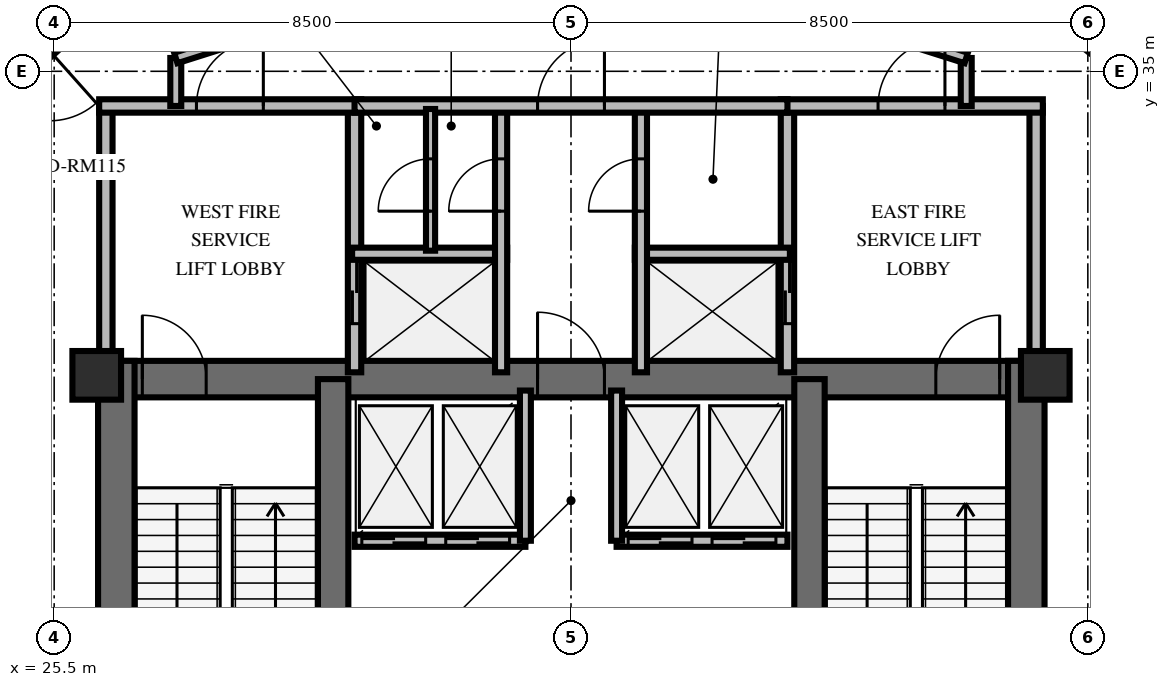
"""IFC4 building model, lengths in metres.
Left out: names, types, materials, properties, quantities, classifications, styles, units other than length and angle.
Written with IfcOpenShell. Run it as: python <this file> out.ifc"""

import sys

from ifc_helpers import new_model, si_unit, direction, frame, frame_2d, origin, origin_2d, place, context, subcontext, project, spatial, rectangle, extrude, element, fill, save


model = new_model("IFC4")
c1 = context("Model", 3, precision=1e-05, world=origin(), true_north=direction((0.0, 1.0)))
c2 = subcontext(c1, "Body", "Model", "MODEL_VIEW")
j1 = project(units=[si_unit("LENGTHUNIT", "METRE"), si_unit("PLANEANGLEUNIT", "RADIAN")], contexts=[c1])
p1 = place(None, origin())
s1 = spatial("IfcSite", under=j1, at=p1, CompositionType="ELEMENT")
p2 = place(p1, origin())
s2 = spatial("IfcBuilding", under=s1, at=p2, CompositionType="ELEMENT")
p3 = place(p2, frame((0.0, 0.0, 284.4)))
s3 = spatial("IfcBuildingStorey", under=s2, at=p3, CompositionType="ELEMENT", Elevation=284.4)
p4 = place(p3, frame((26.222, 29.938, 0.0), z_axis=(0.0, 0.0, 1.0), x_axis=(1.0, 0.0, 0.0)))
e1 = element("IfcWall", 1, at=p4, inside=s3, PredefinedType="SHEAR", context=c2, shape_type="SweptSolid", body=[
    extrude(rectangle(XDim=15.566, YDim=0.6, at=frame_2d((7.783, 0.0))), origin(), (0.0, 0.0, 1.0), 3.6),
])
p5 = place(p4, frame((0.728, 0.0, 0.0)))
e2 = element("IfcOpeningElement", 2, at=p5, cuts=e1, PredefinedType="OPENING", context=c2, shape_type="SweptSolid", body=[
    extrude(rectangle(XDim=1.05, YDim=2.15, at=frame_2d((0.525, 1.075))), frame((0.0, 0.31, 0.0), z_axis=(0.0, -1.0, 0.0), x_axis=(1.0, 0.0, 0.0)), (0.0, 0.0, 1.0), 0.62),
])
p6 = place(p4, frame((13.778, 0.0, 0.0)))
e3 = element("IfcOpeningElement", 3, at=p6, cuts=e1, PredefinedType="OPENING", context=c2, shape_type="SweptSolid", body=[
    extrude(rectangle(XDim=1.05, YDim=2.15, at=frame_2d((0.525, 1.075))), frame((0.0, 0.31, 0.0), z_axis=(0.0, -1.0, 0.0), x_axis=(1.0, 0.0, 0.0)), (0.0, 0.0, 1.0), 0.62),
])
p7 = place(p4, frame((7.228, 0.0, 0.0)))
e4 = element("IfcOpeningElement", 4, at=p7, cuts=e1, PredefinedType="OPENING", context=c2, shape_type="SweptSolid", body=[
    extrude(rectangle(XDim=1.1, YDim=2.15, at=frame_2d((0.55, 1.075))), frame((0.0, 0.31, 0.0), z_axis=(0.0, -1.0, 0.0), x_axis=(1.0, 0.0, 0.0)), (0.0, 0.0, 1.0), 0.62),
])
for number, where, z_axis, x_axis in (
    (5, (26.522, 19.962, 0.0), (0.0, 0.0, 1.0), (0.0, 1.0, 0.0)),
    (6, (41.488, 19.962, 0.0), (0.0, 0.0, 1.0), (0.0, 1.0, 0.0)),
):
    element("IfcWall", number, at=place(p3, frame(where, z_axis=z_axis, x_axis=x_axis)), inside=s3, PredefinedType="SHEAR", context=c2, shape_type="SweptSolid", body=[
        extrude(rectangle(XDim=10.276, YDim=0.6, at=frame_2d((5.138, 0.0))), origin(), (0.0, 0.0, 1.0), 3.6),
    ])
for number, where, z_axis, x_axis in (
    (7, (30.088, 20.262, 0.0), (0.0, 0.0, 1.0), (0.0, 1.0, 0.0)),
    (8, (37.922, 20.262, 0.0), (0.0, 0.0, 1.0), (0.0, 1.0, 0.0)),
):
    element("IfcWall", number, at=place(p3, frame(where, z_axis=z_axis, x_axis=x_axis)), inside=s3, PredefinedType="SHEAR", context=c2, shape_type="SweptSolid", body=[
        extrude(rectangle(XDim=9.676, YDim=0.5, at=frame_2d((4.838, 0.0))), origin(), (0.0, 0.0, 1.0), 3.6),
    ])
for number, where, z_axis, x_axis in (
    (9, (26.2, 30.0, 0.0), (0.0, 0.0, 1.0), (1.0, 0.0, 0.0)),
    (10, (41.8, 30.0, 0.0), (0.0, 0.0, 1.0), (1.0, 0.0, 0.0)),
):
    element("IfcColumn", number, at=place(p3, frame(where, z_axis=z_axis, x_axis=x_axis)), inside=s3, PredefinedType="PILASTER", context=c2, shape_type="SweptSolid", body=[
        extrude(rectangle(XDim=0.8, YDim=0.8, at=origin_2d()), origin(), (0.0, 0.0, 1.0), 3.6),
    ])
p8 = place(p3, frame((26.35, 30.05, 0.0), z_axis=(0.0, 0.0, 1.0), x_axis=(0.0, 1.0, 0.0)))
e11 = element("IfcWall", 11, at=p8, inside=s3, PredefinedType="SOLIDWALL", context=c2, shape_type="SweptSolid", body=[
    extrude(rectangle(XDim=4.38, YDim=0.22, at=frame_2d((2.19, 0.0))), origin(), (0.0, 0.0, 1.0), 2.12),
])
p9 = place(p3, frame((30.44, 30.05, 0.0), z_axis=(0.0, 0.0, 1.0), x_axis=(0.0, 1.0, 0.0)))
e12 = element("IfcWall", 12, at=p9, inside=s3, PredefinedType="SOLIDWALL", context=c2, shape_type="SweptSolid", body=[
    extrude(rectangle(XDim=4.38, YDim=0.22, at=frame_2d((2.19, 0.0))), origin(), (0.0, 0.0, 1.0), 2.12),
])
p10 = place(p9, frame((0.8, 0.0, 0.0)))
e13 = element("IfcOpeningElement", 13, at=p10, cuts=e12, PredefinedType="OPENING", context=c2, shape_type="SweptSolid", body=[
    extrude(rectangle(XDim=1.05, YDim=2.1, at=frame_2d((0.525, 1.05))), frame((0.0, 0.12, 0.0), z_axis=(0.0, -1.0, 0.0), x_axis=(1.0, 0.0, 0.0)), (0.0, 0.0, 1.0), 0.24),
])
p11 = place(p3, frame((26.24, 34.43, 0.0), z_axis=(0.0, 0.0, 1.0), x_axis=(1.0, 0.0, 0.0)))
e14 = element("IfcWall", 14, at=p11, inside=s3, PredefinedType="SOLIDWALL", context=c2, shape_type="SweptSolid", body=[
    extrude(rectangle(XDim=4.31, YDim=0.22, at=frame_2d((2.155, 0.0))), origin(), (0.0, 0.0, 1.0), 2.12),
])
p12 = place(p11, frame((1.6, 0.0, 0.0)))
e15 = element("IfcOpeningElement", 15, at=p12, cuts=e14, PredefinedType="OPENING", context=c2, shape_type="SweptSolid", body=[
    extrude(rectangle(XDim=1.1, YDim=2.15, at=frame_2d((0.55, 1.075))), frame((0.0, 0.12, 0.0), z_axis=(0.0, -1.0, 0.0), x_axis=(1.0, 0.0, 0.0)), (0.0, 0.0, 1.0), 0.24),
])
p13 = place(p3, frame((30.4, 32.0, 0.0), z_axis=(0.0, 0.0, 1.0), x_axis=(1.0, 0.0, 0.0)))
e16 = element("IfcWall", 16, at=p13, inside=s3, PredefinedType="SOLIDWALL", context=c2, shape_type="SweptSolid", body=[
    extrude(rectangle(XDim=2.55, YDim=0.2, at=frame_2d((1.275, 0.0))), origin(), (0.0, 0.0, 1.0), 2.12),
])
p14 = place(p3, frame((32.85, 30.05, 0.0), z_axis=(0.0, 0.0, 1.0), x_axis=(0.0, 1.0, 0.0)))
e17 = element("IfcWall", 17, at=p14, inside=s3, PredefinedType="SOLIDWALL", context=c2, shape_type="SweptSolid", body=[
    extrude(rectangle(XDim=4.38, YDim=0.2, at=frame_2d((2.19, 0.0))), origin(), (0.0, 0.0, 1.0), 2.12),
])
p15 = place(p14, frame((2.65, 0.0, 0.0)))
e18 = element("IfcOpeningElement", 18, at=p15, cuts=e17, PredefinedType="OPENING", context=c2, shape_type="SweptSolid", body=[
    extrude(rectangle(XDim=0.86, YDim=2.05, at=frame_2d((0.43, 1.025))), frame((0.0, 0.11, 0.0), z_axis=(0.0, -1.0, 0.0), x_axis=(1.0, 0.0, 0.0)), (0.0, 0.0, 1.0), 0.22),
])
p16 = place(p3, frame((37.56, 30.05, 0.0), z_axis=(0.0, 0.0, 1.0), x_axis=(0.0, 1.0, 0.0)))
e19 = element("IfcWall", 19, at=p16, inside=s3, PredefinedType="SOLIDWALL", context=c2, shape_type="SweptSolid", body=[
    extrude(rectangle(XDim=4.38, YDim=0.22, at=frame_2d((2.19, 0.0))), origin(), (0.0, 0.0, 1.0), 2.12),
])
p17 = place(p16, frame((0.8, 0.0, 0.0)))
e20 = element("IfcOpeningElement", 20, at=p17, cuts=e19, PredefinedType="OPENING", context=c2, shape_type="SweptSolid", body=[
    extrude(rectangle(XDim=1.05, YDim=2.1, at=frame_2d((0.525, 1.05))), frame((0.0, 0.12, 0.0), z_axis=(0.0, -1.0, 0.0), x_axis=(1.0, 0.0, 0.0)), (0.0, 0.0, 1.0), 0.24),
])
p18 = place(p3, frame((41.65, 30.05, 0.0), z_axis=(0.0, 0.0, 1.0), x_axis=(0.0, 1.0, 0.0)))
e21 = element("IfcWall", 21, at=p18, inside=s3, PredefinedType="SOLIDWALL", context=c2, shape_type="SweptSolid", body=[
    extrude(rectangle(XDim=4.38, YDim=0.22, at=frame_2d((2.19, 0.0))), origin(), (0.0, 0.0, 1.0), 2.12),
])
p19 = place(p3, frame((37.45, 34.43, 0.0), z_axis=(0.0, 0.0, 1.0), x_axis=(1.0, 0.0, 0.0)))
e22 = element("IfcWall", 22, at=p19, inside=s3, PredefinedType="SOLIDWALL", context=c2, shape_type="SweptSolid", body=[
    extrude(rectangle(XDim=4.31, YDim=0.22, at=frame_2d((2.155, 0.0))), origin(), (0.0, 0.0, 1.0), 2.12),
])
p20 = place(p19, frame((1.6, 0.0, 0.0)))
e23 = element("IfcOpeningElement", 23, at=p20, cuts=e22, PredefinedType="OPENING", context=c2, shape_type="SweptSolid", body=[
    extrude(rectangle(XDim=1.1, YDim=2.15, at=frame_2d((0.55, 1.075))), frame((0.0, 0.12, 0.0), z_axis=(0.0, -1.0, 0.0), x_axis=(1.0, 0.0, 0.0)), (0.0, 0.0, 1.0), 0.24),
])
p21 = place(p3, frame((35.05, 32.0, 0.0), z_axis=(0.0, 0.0, 1.0), x_axis=(1.0, 0.0, 0.0)))
e24 = element("IfcWall", 24, at=p21, inside=s3, PredefinedType="SOLIDWALL", context=c2, shape_type="SweptSolid", body=[
    extrude(rectangle(XDim=2.55, YDim=0.2, at=frame_2d((1.275, 0.0))), origin(), (0.0, 0.0, 1.0), 2.12),
])
p22 = place(p3, frame((35.15, 30.05, 0.0), z_axis=(0.0, 0.0, 1.0), x_axis=(0.0, 1.0, 0.0)))
e25 = element("IfcWall", 25, at=p22, inside=s3, PredefinedType="SOLIDWALL", context=c2, shape_type="SweptSolid", body=[
    extrude(rectangle(XDim=4.38, YDim=0.2, at=frame_2d((2.19, 0.0))), origin(), (0.0, 0.0, 1.0), 2.12),
])
p23 = place(p22, frame((2.65, 0.0, 0.0)))
e26 = element("IfcOpeningElement", 26, at=p23, cuts=e25, PredefinedType="OPENING", context=c2, shape_type="SweptSolid", body=[
    extrude(rectangle(XDim=0.86, YDim=2.05, at=frame_2d((0.43, 1.025))), frame((0.0, 0.11, 0.0), z_axis=(0.0, -1.0, 0.0), x_axis=(1.0, 0.0, 0.0)), (0.0, 0.0, 1.0), 0.22),
])
p24 = place(p3, frame((30.44, 34.43, 0.0), z_axis=(0.0, 0.0, 1.0), x_axis=(1.0, 0.0, 0.0)))
e27 = element("IfcWall", 27, at=p24, inside=s3, PredefinedType="SOLIDWALL", context=c2, shape_type="SweptSolid", body=[
    extrude(rectangle(XDim=7.12, YDim=0.22, at=frame_2d((3.56, 0.0))), origin(), (0.0, 0.0, 1.0), 2.12),
])
p25 = place(p24, frame((3.01, 0.0, 0.0)))
e28 = element("IfcOpeningElement", 28, at=p25, cuts=e27, PredefinedType="OPENING", context=c2, shape_type="SweptSolid", body=[
    extrude(rectangle(XDim=1.1, YDim=2.15, at=frame_2d((0.55, 1.075))), frame((0.0, 0.12, 0.0), z_axis=(0.0, -1.0, 0.0), x_axis=(1.0, 0.0, 0.0)), (0.0, 0.0, 1.0), 0.24),
])
p26 = place(p3, frame((31.69, 32.05, 0.0), z_axis=(0.0, 0.0, 1.0), x_axis=(0.0, 1.0, 0.0)))
e29 = element("IfcWall", 29, at=p26, inside=s3, PredefinedType="PARTITIONING", context=c2, shape_type="SweptSolid", body=[
    extrude(rectangle(XDim=2.33, YDim=0.15, at=frame_2d((1.165, 0.0))), origin(), (0.0, 0.0, 1.0), 2.12),
])
p27 = place(p26, frame((0.65, 0.0, 0.0)))
e30 = element("IfcOpeningElement", 30, at=p27, cuts=e29, PredefinedType="OPENING", context=c2, shape_type="SweptSolid", body=[
    extrude(rectangle(XDim=0.86, YDim=2.05, at=frame_2d((0.43, 1.025))), frame((0.0, 0.085, 0.0), z_axis=(0.0, -1.0, 0.0), x_axis=(1.0, 0.0, 0.0)), (0.0, 0.0, 1.0), 0.17),
])
p28 = place(p3, frame((30.44, 27.28, 0.0), z_axis=(0.0, 0.0, 1.0), x_axis=(1.0, 0.0, 0.0)))
e31 = element("IfcWall", 31, at=p28, inside=s3, PredefinedType="SOLIDWALL", context=c2, shape_type="SweptSolid", body=[
    extrude(rectangle(XDim=2.81, YDim=0.2, at=frame_2d((1.405, 0.0))), origin(), (0.0, 0.0, 1.0), 2.1),
])
p29 = place(p28, frame((0.12, 0.0, 0.0)))
e32 = element("IfcOpeningElement", 32, at=p29, cuts=e31, PredefinedType="OPENING", context=c2, shape_type="SweptSolid", body=[
    extrude(rectangle(XDim=1.05, YDim=2.1, at=frame_2d((0.525, 1.05))), frame((0.0, 0.11, 0.0), z_axis=(0.0, -1.0, 0.0), x_axis=(1.0, 0.0, 0.0)), (0.0, 0.0, 1.0), 0.22),
])
p30 = place(p28, frame((1.5, 0.0, 0.0)))
e33 = element("IfcOpeningElement", 33, at=p30, cuts=e31, PredefinedType="OPENING", context=c2, shape_type="SweptSolid", body=[
    extrude(rectangle(XDim=1.05, YDim=2.1, at=frame_2d((0.525, 1.05))), frame((0.0, 0.11, 0.0), z_axis=(0.0, -1.0, 0.0), x_axis=(1.0, 0.0, 0.0)), (0.0, 0.0, 1.0), 0.22),
])
p31 = place(p3, frame((33.25, 27.28, 0.0), z_axis=(0.0, 0.0, 1.0), x_axis=(0.0, 1.0, 0.0)))
e34 = element("IfcWall", 34, at=p31, inside=s3, PredefinedType="SOLIDWALL", context=c2, shape_type="SweptSolid", body=[
    extrude(rectangle(XDim=2.47, YDim=0.18, at=frame_2d((1.235, 0.0))), origin(), (0.0, 0.0, 1.0), 2.12),
])
p32 = place(p3, frame((34.75, 27.28, 0.0), z_axis=(0.0, 0.0, 1.0), x_axis=(1.0, 0.0, 0.0)))
e35 = element("IfcWall", 35, at=p32, inside=s3, PredefinedType="SOLIDWALL", context=c2, shape_type="SweptSolid", body=[
    extrude(rectangle(XDim=2.81, YDim=0.2, at=frame_2d((1.405, 0.0))), origin(), (0.0, 0.0, 1.0), 2.1),
])
p33 = place(p32, frame((0.19, 0.0, 0.0)))
e36 = element("IfcOpeningElement", 36, at=p33, cuts=e35, PredefinedType="OPENING", context=c2, shape_type="SweptSolid", body=[
    extrude(rectangle(XDim=1.05, YDim=2.1, at=frame_2d((0.525, 1.05))), frame((0.0, 0.11, 0.0), z_axis=(0.0, -1.0, 0.0), x_axis=(1.0, 0.0, 0.0)), (0.0, 0.0, 1.0), 0.22),
])
p34 = place(p32, frame((1.57, 0.0, 0.0)))
e37 = element("IfcOpeningElement", 37, at=p34, cuts=e35, PredefinedType="OPENING", context=c2, shape_type="SweptSolid", body=[
    extrude(rectangle(XDim=1.05, YDim=2.1, at=frame_2d((0.525, 1.05))), frame((0.0, 0.11, 0.0), z_axis=(0.0, -1.0, 0.0), x_axis=(1.0, 0.0, 0.0)), (0.0, 0.0, 1.0), 0.22),
])
p35 = place(p3, frame((34.75, 27.28, 0.0), z_axis=(0.0, 0.0, 1.0), x_axis=(0.0, 1.0, 0.0)))
e38 = element("IfcWall", 38, at=p35, inside=s3, PredefinedType="SOLIDWALL", context=c2, shape_type="SweptSolid", body=[
    extrude(rectangle(XDim=2.47, YDim=0.18, at=frame_2d((1.235, 0.0))), origin(), (0.0, 0.0, 1.0), 2.12),
])
for number, where, z_axis, x_axis in (
    (39, (27.5, 34.43, 0.0), (0.0, 0.0, 1.0), (0.0, 1.0, 0.0)),
    (40, (40.5, 35.219, 0.0), (0.0, 0.0, 1.0), (0.0, -1.0, 0.0)),
):
    element("IfcWall", number, at=place(p3, frame(where, z_axis=z_axis, x_axis=x_axis)), inside=s3, PredefinedType="PARTITIONING", context=c2, shape_type="SweptSolid", body=[
        extrude(rectangle(XDim=0.789, YDim=0.18, at=frame_2d((0.395, 0.0))), origin(), (0.0, 0.0, 1.0), 2.12),
    ])
p36 = place(p3, frame((27.5, 35.219, 0.0), z_axis=(0.0, 0.0, 1.0), x_axis=(0.953228121756, 0.302251795518, 0.0)))
e41 = element("IfcWall", 41, at=p36, inside=s3, PredefinedType="PARTITIONING", context=c2, shape_type="SweptSolid", body=[
    extrude(rectangle(XDim=6.819, YDim=0.18, at=frame_2d((3.409, 0.0))), origin(), (0.0, 0.0, 1.0), 2.12),
])
p37 = place(p36, frame((2.86, 0.0, 0.0)))
e42 = element("IfcOpeningElement", 42, at=p37, cuts=e41, PredefinedType="OPENING", context=c2, shape_type="SweptSolid", body=[
    extrude(rectangle(XDim=1.1, YDim=2.15, at=frame_2d((0.55, 1.075))), frame((0.0, 0.1, 0.0), z_axis=(0.0, -1.0, 0.0), x_axis=(1.0, 0.0, 0.0)), (0.0, 0.0, 1.0), 0.2),
])
p38 = place(p3, frame((34.0, 37.28, 0.0), z_axis=(0.0, 0.0, 1.0), x_axis=(0.953228121756, -0.302251795518, 0.0)))
e43 = element("IfcWall", 43, at=p38, inside=s3, PredefinedType="PARTITIONING", context=c2, shape_type="SweptSolid", body=[
    extrude(rectangle(XDim=6.819, YDim=0.18, at=frame_2d((3.409, 0.0))), origin(), (0.0, 0.0, 1.0), 2.12),
])
p39 = place(p38, frame((2.86, 0.0, 0.0)))
e44 = element("IfcOpeningElement", 44, at=p39, cuts=e43, PredefinedType="OPENING", context=c2, shape_type="SweptSolid", body=[
    extrude(rectangle(XDim=1.1, YDim=2.15, at=frame_2d((0.55, 1.075))), frame((0.0, 0.1, 0.0), z_axis=(0.0, -1.0, 0.0), x_axis=(1.0, 0.0, 0.0)), (0.0, 0.0, 1.0), 0.2),
])
p40 = place(p3, frame((43.602, 34.57, 0.0), z_axis=(0.0, 0.0, 1.0), x_axis=(-0.785308997731, 0.61910401233, 0.0)))
e45 = element("IfcWall", 45, at=p40, inside=s3, PredefinedType="PARTITIONING", context=c2, shape_type="SweptSolid", body=[
    extrude(rectangle(XDim=4.47, YDim=0.18, at=frame_2d((2.235, 0.0))), origin(), (0.0, 0.0, 1.0), 2.12),
])
p41 = place(p3, frame((27.228, 36.944, 0.0), z_axis=(0.0, 0.0, 1.0), x_axis=(-0.74603650921, -0.665905043475, 0.0)))
e46 = element("IfcWall", 46, at=p41, inside=s3, PredefinedType="PARTITIONING", context=c2, shape_type="SweptSolid", body=[
    extrude(rectangle(XDim=4.469, YDim=0.18, at=frame_2d((2.235, 0.0))), origin(), (0.0, 0.0, 1.0), 2.12),
])
p42 = place(p41, frame((2.415, 0.0, 0.0)))
e47 = element("IfcOpeningElement", 47, at=p42, cuts=e46, PredefinedType="OPENING", context=c2, shape_type="SweptSolid", body=[
    extrude(rectangle(XDim=1.15, YDim=2.15, at=frame_2d((0.575, 1.075))), frame((0.0, 0.1, 0.0), z_axis=(0.0, -1.0, 0.0), x_axis=(1.0, 0.0, 0.0)), (0.0, 0.0, 1.0), 0.2),
])
p43 = place(p5, origin())
e48 = element("IfcDoor", 48, at=p43, inside=s3, OperationType="SINGLE_SWING_LEFT", PredefinedType="DOOR", context=c2, shape_type="SweptSolid", body=[
    extrude(rectangle(XDim=1.05, YDim=2.15, at=frame_2d((0.525, 1.075))), frame((0.0, 0.025, 0.0), z_axis=(0.0, -1.0, 0.0), x_axis=(1.0, 0.0, 0.0)), (0.0, 0.0, 1.0), 0.05),
])
fill(e2, e48)
p44 = place(p6, origin())
e49 = element("IfcDoor", 49, at=p44, inside=s3, OperationType="SINGLE_SWING_RIGHT", PredefinedType="DOOR", context=c2, shape_type="SweptSolid", body=[
    extrude(rectangle(XDim=1.05, YDim=2.15, at=frame_2d((0.525, 1.075))), frame((0.0, 0.025, 0.0), z_axis=(0.0, -1.0, 0.0), x_axis=(1.0, 0.0, 0.0)), (0.0, 0.0, 1.0), 0.05),
])
fill(e3, e49)
p45 = place(p7, origin())
e50 = element("IfcDoor", 50, at=p45, inside=s3, OperationType="SINGLE_SWING_LEFT", PredefinedType="DOOR", context=c2, shape_type="SweptSolid", body=[
    extrude(rectangle(XDim=1.1, YDim=2.15, at=frame_2d((0.55, 1.075))), frame((0.0, 0.025, 0.0), z_axis=(0.0, -1.0, 0.0), x_axis=(1.0, 0.0, 0.0)), (0.0, 0.0, 1.0), 0.05),
])
fill(e4, e50)
p46 = place(p12, origin())
e51 = element("IfcDoor", 51, at=p46, inside=s3, OperationType="SINGLE_SWING_RIGHT", PredefinedType="DOOR", context=c2, shape_type="SweptSolid", body=[
    extrude(rectangle(XDim=1.1, YDim=2.15, at=frame_2d((0.55, 1.075))), frame((0.0, 0.025, 0.0), z_axis=(0.0, -1.0, 0.0), x_axis=(1.0, 0.0, 0.0)), (0.0, 0.0, 1.0), 0.05),
])
fill(e15, e51)
p47 = place(p10, origin())
e52 = element("IfcDoor", 52, at=p47, inside=s3, OperationType="DOUBLE_DOOR_SLIDING", PredefinedType="USERDEFINED", context=c2, shape_type="SweptSolid", body=[
    extrude(rectangle(XDim=1.05, YDim=2.1, at=frame_2d((0.525, 1.05))), frame((0.0, 0.025, 0.0), z_axis=(0.0, -1.0, 0.0), x_axis=(1.0, 0.0, 0.0)), (0.0, 0.0, 1.0), 0.05),
])
fill(e13, e52)
p48 = place(p15, origin())
e53 = element("IfcDoor", 53, at=p48, inside=s3, OperationType="SINGLE_SWING_LEFT", PredefinedType="TRAPDOOR", context=c2, shape_type="SweptSolid", body=[
    extrude(rectangle(XDim=0.86, YDim=2.05, at=frame_2d((0.43, 1.025))), frame((0.0, 0.025, 0.0), z_axis=(0.0, -1.0, 0.0), x_axis=(1.0, 0.0, 0.0)), (0.0, 0.0, 1.0), 0.05),
])
fill(e18, e53)
p49 = place(p20, origin())
e54 = element("IfcDoor", 54, at=p49, inside=s3, OperationType="SINGLE_SWING_RIGHT", PredefinedType="DOOR", context=c2, shape_type="SweptSolid", body=[
    extrude(rectangle(XDim=1.1, YDim=2.15, at=frame_2d((0.55, 1.075))), frame((0.0, 0.025, 0.0), z_axis=(0.0, -1.0, 0.0), x_axis=(1.0, 0.0, 0.0)), (0.0, 0.0, 1.0), 0.05),
])
fill(e23, e54)
p50 = place(p17, origin())
e55 = element("IfcDoor", 55, at=p50, inside=s3, OperationType="DOUBLE_DOOR_SLIDING", PredefinedType="USERDEFINED", context=c2, shape_type="SweptSolid", body=[
    extrude(rectangle(XDim=1.05, YDim=2.1, at=frame_2d((0.525, 1.05))), frame((0.0, 0.025, 0.0), z_axis=(0.0, -1.0, 0.0), x_axis=(1.0, 0.0, 0.0)), (0.0, 0.0, 1.0), 0.05),
])
fill(e20, e55)
p51 = place(p23, origin())
e56 = element("IfcDoor", 56, at=p51, inside=s3, OperationType="SINGLE_SWING_LEFT", PredefinedType="TRAPDOOR", context=c2, shape_type="SweptSolid", body=[
    extrude(rectangle(XDim=0.86, YDim=2.05, at=frame_2d((0.43, 1.025))), frame((0.0, 0.025, 0.0), z_axis=(0.0, -1.0, 0.0), x_axis=(1.0, 0.0, 0.0)), (0.0, 0.0, 1.0), 0.05),
])
fill(e26, e56)
p52 = place(p25, origin())
e57 = element("IfcDoor", 57, at=p52, inside=s3, OperationType="SINGLE_SWING_RIGHT", PredefinedType="DOOR", context=c2, shape_type="SweptSolid", body=[
    extrude(rectangle(XDim=1.1, YDim=2.15, at=frame_2d((0.55, 1.075))), frame((0.0, 0.025, 0.0), z_axis=(0.0, -1.0, 0.0), x_axis=(1.0, 0.0, 0.0)), (0.0, 0.0, 1.0), 0.05),
])
fill(e28, e57)
p53 = place(p27, origin())
e58 = element("IfcDoor", 58, at=p53, inside=s3, OperationType="SINGLE_SWING_LEFT", PredefinedType="TRAPDOOR", context=c2, shape_type="SweptSolid", body=[
    extrude(rectangle(XDim=0.86, YDim=2.05, at=frame_2d((0.43, 1.025))), frame((0.0, 0.025, 0.0), z_axis=(0.0, -1.0, 0.0), x_axis=(1.0, 0.0, 0.0)), (0.0, 0.0, 1.0), 0.05),
])
fill(e30, e58)
p54 = place(p29, origin())
e59 = element("IfcDoor", 59, at=p54, inside=s3, OperationType="DOUBLE_DOOR_SLIDING", PredefinedType="USERDEFINED", context=c2, shape_type="SweptSolid", body=[
    extrude(rectangle(XDim=1.05, YDim=2.1, at=frame_2d((0.525, 1.05))), frame((0.0, 0.025, 0.0), z_axis=(0.0, -1.0, 0.0), x_axis=(1.0, 0.0, 0.0)), (0.0, 0.0, 1.0), 0.05),
])
fill(e32, e59)
p55 = place(p30, origin())
e60 = element("IfcDoor", 60, at=p55, inside=s3, OperationType="DOUBLE_DOOR_SLIDING", PredefinedType="USERDEFINED", context=c2, shape_type="SweptSolid", body=[
    extrude(rectangle(XDim=1.05, YDim=2.1, at=frame_2d((0.525, 1.05))), frame((0.0, 0.025, 0.0), z_axis=(0.0, -1.0, 0.0), x_axis=(1.0, 0.0, 0.0)), (0.0, 0.0, 1.0), 0.05),
])
fill(e33, e60)
p56 = place(p33, origin())
e61 = element("IfcDoor", 61, at=p56, inside=s3, OperationType="DOUBLE_DOOR_SLIDING", PredefinedType="USERDEFINED", context=c2, shape_type="SweptSolid", body=[
    extrude(rectangle(XDim=1.05, YDim=2.1, at=frame_2d((0.525, 1.05))), frame((0.0, 0.025, 0.0), z_axis=(0.0, -1.0, 0.0), x_axis=(1.0, 0.0, 0.0)), (0.0, 0.0, 1.0), 0.05),
])
fill(e36, e61)
p57 = place(p34, origin())
e62 = element("IfcDoor", 62, at=p57, inside=s3, OperationType="DOUBLE_DOOR_SLIDING", PredefinedType="USERDEFINED", context=c2, shape_type="SweptSolid", body=[
    extrude(rectangle(XDim=1.05, YDim=2.1, at=frame_2d((0.525, 1.05))), frame((0.0, 0.025, 0.0), z_axis=(0.0, -1.0, 0.0), x_axis=(1.0, 0.0, 0.0)), (0.0, 0.0, 1.0), 0.05),
])
fill(e37, e62)
save(model, sys.argv[1])
